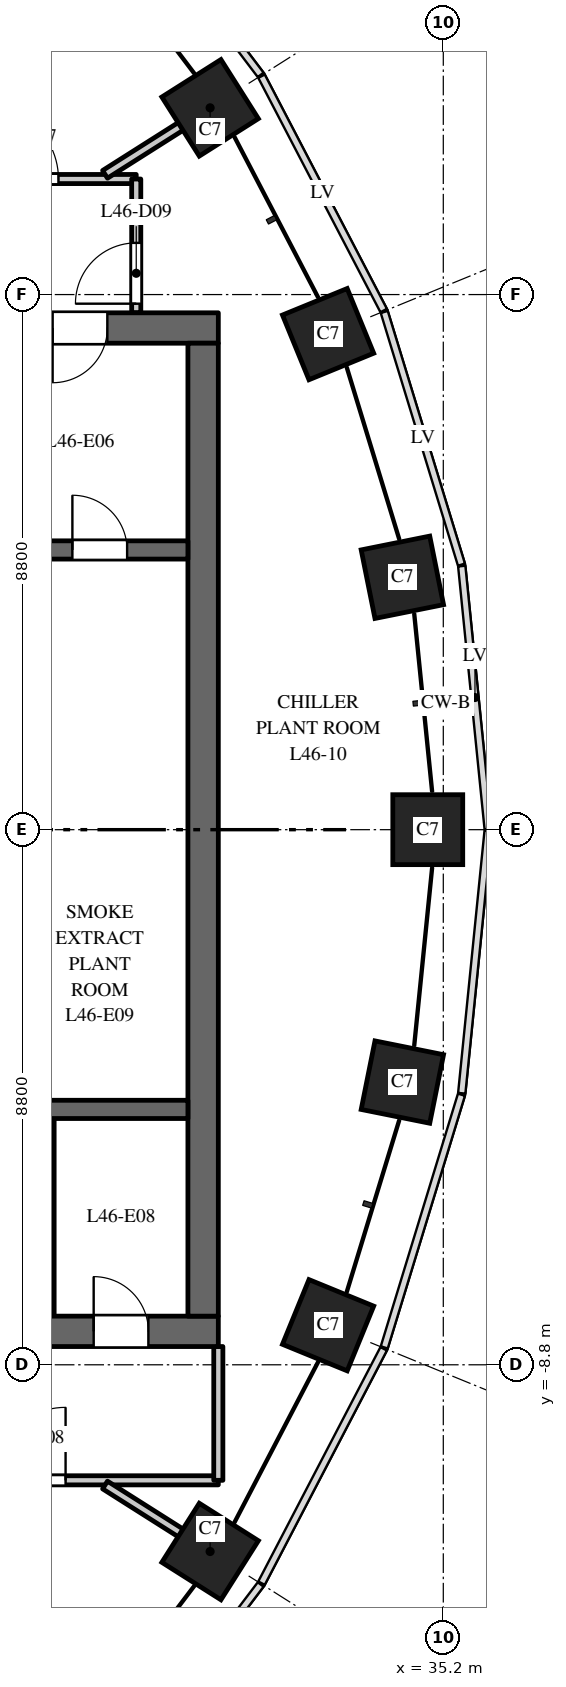
"""IFC4 building model, lengths in metres.
Left out: names, types, materials, properties, quantities, classifications, styles, units other than length and angle.
Written with IfcOpenShell. Run it as: python <this file> out.ifc"""

import sys

from ifc_helpers import new_model, si_unit, direction, frame, frame_2d, origin, origin_2d, place, context, subcontext, project, spatial, rectangle, extrude, element, fill, save


model = new_model("IFC4")
c1 = context("Model", 3, precision=1e-05, world=origin(), true_north=direction((0.0, 1.0)))
c2 = subcontext(c1, "Body", "Model", "MODEL_VIEW")
j1 = project(units=[si_unit("LENGTHUNIT", "METRE"), si_unit("PLANEANGLEUNIT", "RADIAN")], contexts=[c1])
p1 = place(None, origin())
s1 = spatial("IfcSite", under=j1, at=p1, CompositionType="ELEMENT")
p2 = place(p1, origin())
s2 = spatial("IfcBuilding", under=s1, at=p2, CompositionType="ELEMENT")
p3 = place(p2, frame((0.0, 0.0, 198.0)))
s3 = spatial("IfcBuildingStorey", under=s2, at=p3, CompositionType="ELEMENT", Elevation=198.0)
for number, where, z_axis, x_axis in (
    (1, (34.945, 0.0, 0.0), (0.0, 0.0, 1.0), (0.0, 1.0, 0.0)),
    (2, (34.527, 4.151, 0.0), (0.0, 0.0, 1.0), (-0.197, 0.98, 0.0)),
    (3, (33.305, 8.149, 0.0), (0.0, 0.0, 1.0), (-0.379, 0.925, 0.0)),
    (4, (31.365, 11.871, 0.0), (0.0, 0.0, 1.0), (-0.535, 0.845, 0.0)),
    (5, (31.365, -11.871, 0.0), (0.0, 0.0, 1.0), (0.535, 0.845, 0.0)),
    (6, (33.305, -8.149, 0.0), (0.0, 0.0, 1.0), (0.379, 0.925, 0.0)),
    (7, (34.527, -4.151, 0.0), (0.0, 0.0, 1.0), (0.197, 0.98, 0.0)),
):
    element("IfcColumn", number, at=place(p3, frame(where, z_axis=z_axis, x_axis=x_axis)), inside=s3, PredefinedType="COLUMN", context=c2, shape_type="SweptSolid", body=[
        extrude(rectangle(XDim=1.15, YDim=1.15, at=origin_2d()), origin(), (0.0, 0.0, 1.0), 5.5),
    ])
p4 = place(p3, frame((16.5, 8.25, 0.0), z_axis=(0.0, 0.0, 1.0), x_axis=(1.0, 0.0, 0.0)))
e8 = element("IfcWall", 8, at=p4, inside=s3, PredefinedType="SHEAR", context=c2, shape_type="SweptSolid", body=[
    extrude(rectangle(XDim=15.0, YDim=0.5, at=frame_2d((7.5, 0.0))), origin(), (0.0, 0.0, 1.0), 5.15),
])
p5 = place(p4, frame((6.9, 0.0, 0.0)))
e9 = element("IfcOpeningElement", 9, at=p5, cuts=e8, PredefinedType="OPENING", context=c2, shape_type="SweptSolid", body=[
    extrude(rectangle(XDim=1.2, YDim=2.1, at=frame_2d((0.6, 1.05))), frame((0.0, 0.26, 0.0), z_axis=(0.0, -1.0, 0.0), x_axis=(1.0, 0.0, 0.0)), (0.0, 0.0, 1.0), 0.52),
])
p6 = place(p4, frame((12.275, 0.0, 0.0)))
e10 = element("IfcOpeningElement", 10, at=p6, cuts=e8, PredefinedType="OPENING", context=c2, shape_type="SweptSolid", body=[
    extrude(rectangle(XDim=0.9, YDim=2.1, at=frame_2d((0.45, 1.05))), frame((0.0, 0.26, 0.0), z_axis=(0.0, -1.0, 0.0), x_axis=(1.0, 0.0, 0.0)), (0.0, 0.0, 1.0), 0.52),
])
p7 = place(p3, frame((16.5, -8.25, 0.0), z_axis=(0.0, 0.0, 1.0), x_axis=(1.0, 0.0, 0.0)))
e11 = element("IfcWall", 11, at=p7, inside=s3, PredefinedType="SHEAR", context=c2, shape_type="SweptSolid", body=[
    extrude(rectangle(XDim=15.0, YDim=0.5, at=frame_2d((7.5, 0.0))), origin(), (0.0, 0.0, 1.0), 5.15),
])
p8 = place(p7, frame((6.9, 0.0, 0.0)))
e12 = element("IfcOpeningElement", 12, at=p8, cuts=e11, PredefinedType="OPENING", context=c2, shape_type="SweptSolid", body=[
    extrude(rectangle(XDim=1.2, YDim=2.1, at=frame_2d((0.6, 1.05))), frame((0.0, 0.26, 0.0), z_axis=(0.0, -1.0, 0.0), x_axis=(1.0, 0.0, 0.0)), (0.0, 0.0, 1.0), 0.52),
])
p9 = place(p7, frame((12.95, 0.0, 0.0)))
e13 = element("IfcOpeningElement", 13, at=p9, cuts=e11, PredefinedType="OPENING", context=c2, shape_type="SweptSolid", body=[
    extrude(rectangle(XDim=0.9, YDim=2.1, at=frame_2d((0.45, 1.05))), frame((0.0, 0.26, 0.0), z_axis=(0.0, -1.0, 0.0), x_axis=(1.0, 0.0, 0.0)), (0.0, 0.0, 1.0), 0.52),
])
p10 = place(p3, frame((31.25, -8.0, 0.0), z_axis=(0.0, 0.0, 1.0), x_axis=(0.0, 1.0, 0.0)))
e14 = element("IfcWall", 14, at=p10, inside=s3, PredefinedType="SHEAR", context=c2, shape_type="SweptSolid", body=[
    extrude(rectangle(XDim=16.0, YDim=0.5, at=frame_2d((8.0, 0.0))), origin(), (0.0, 0.0, 1.0), 5.15),
])
p11 = place(p3, frame((24.9, 4.6, 0.0), z_axis=(0.0, 0.0, 1.0), x_axis=(1.0, 0.0, 0.0)))
e15 = element("IfcWall", 15, at=p11, inside=s3, PredefinedType="SHEAR", context=c2, shape_type="SweptSolid", body=[
    extrude(rectangle(XDim=6.1, YDim=0.3, at=frame_2d((3.05, 0.0))), origin(), (0.0, 0.0, 1.0), 5.15),
])
p12 = place(p11, frame((4.2, 0.0, 0.0)))
e16 = element("IfcOpeningElement", 16, at=p12, cuts=e15, PredefinedType="OPENING", context=c2, shape_type="SweptSolid", body=[
    extrude(rectangle(XDim=0.9, YDim=2.1, at=frame_2d((0.45, 1.05))), frame((0.0, 0.16, 0.0), z_axis=(0.0, -1.0, 0.0), x_axis=(1.0, 0.0, 0.0)), (0.0, 0.0, 1.0), 0.32),
])
p13 = place(p3, frame((28.7, -8.0, 0.0), z_axis=(0.0, 0.0, 1.0), x_axis=(0.0, 1.0, 0.0)))
e17 = element("IfcWall", 17, at=p13, inside=s3, PredefinedType="PARTITIONING", context=c2, shape_type="SweptSolid", body=[
    extrude(rectangle(XDim=3.25, YDim=0.2, at=frame_2d((1.625, 0.0))), origin(), (0.0, 0.0, 1.0), 5.15),
])
p14 = place(p3, frame((24.9, -4.6, 0.0), z_axis=(0.0, 0.0, 1.0), x_axis=(1.0, 0.0, 0.0)))
e18 = element("IfcWall", 18, at=p14, inside=s3, PredefinedType="SHEAR", context=c2, shape_type="SweptSolid", body=[
    extrude(rectangle(XDim=6.1, YDim=0.3, at=frame_2d((3.05, 0.0))), origin(), (0.0, 0.0, 1.0), 5.15),
])
p15 = place(p3, frame((20.746, -10.7, 0.0), z_axis=(0.0, 0.0, 1.0), x_axis=(1.0, 0.0, 0.0)))
e19 = element("IfcWall", 19, at=p15, inside=s3, PredefinedType="PARTITIONING", context=c2, shape_type="SweptSolid", body=[
    extrude(rectangle(XDim=10.754, YDim=0.15, at=frame_2d((5.377, 0.0))), origin(), (0.0, 0.0, 1.0), 5.15),
])
p16 = place(p15, frame((7.042, 0.0, 0.0)))
e20 = element("IfcOpeningElement", 20, at=p16, cuts=e19, PredefinedType="OPENING", context=c2, shape_type="SweptSolid", body=[
    extrude(rectangle(XDim=1.2, YDim=2.1, at=frame_2d((0.6, 1.05))), frame((0.0, 0.085, 0.0), z_axis=(0.0, -1.0, 0.0), x_axis=(1.0, 0.0, 0.0)), (0.0, 0.0, 1.0), 0.17),
])
p17 = place(p3, frame((20.746, 10.7, 0.0), z_axis=(0.0, 0.0, 1.0), x_axis=(1.0, 0.0, 0.0)))
e21 = element("IfcWall", 21, at=p17, inside=s3, PredefinedType="PARTITIONING", context=c2, shape_type="SweptSolid", body=[
    extrude(rectangle(XDim=9.404, YDim=0.15, at=frame_2d((4.702, 0.0))), origin(), (0.0, 0.0, 1.0), 5.15),
])
p18 = place(p17, frame((6.925, 0.0, 0.0)))
e22 = element("IfcOpeningElement", 22, at=p18, cuts=e21, PredefinedType="OPENING", context=c2, shape_type="SweptSolid", body=[
    extrude(rectangle(XDim=1.2, YDim=2.1, at=frame_2d((0.6, 1.05))), frame((0.0, 0.085, 0.0), z_axis=(0.0, -1.0, 0.0), x_axis=(1.0, 0.0, 0.0)), (0.0, 0.0, 1.0), 0.17),
])
for number, where, z_axis, x_axis in (
    (23, (29.637, -10.777, 0.0), (0.0, 0.0, 1.0), (0.845, -0.535, 0.0)),
    (24, (29.637, 10.777, 0.0), (0.0, 0.0, 1.0), (0.845, 0.535, 0.0)),
):
    element("IfcWall", number, at=place(p3, frame(where, z_axis=z_axis, x_axis=x_axis)), inside=s3, PredefinedType="PARTITIONING", context=c2, shape_type="SweptSolid", body=[
        extrude(rectangle(XDim=2.145, YDim=0.15, at=frame_2d((1.073, 0.0))), origin(), (0.0, 0.0, 1.0), 5.15),
    ])
p19 = place(p3, frame((31.5, -10.7, 0.0), z_axis=(0.0, 0.0, 1.0), x_axis=(0.0, 1.0, 0.0)))
e25 = element("IfcWall", 25, at=p19, inside=s3, PredefinedType="PARTITIONING", context=c2, shape_type="SweptSolid", body=[
    extrude(rectangle(XDim=2.2, YDim=0.15, at=frame_2d((1.1, 0.0))), origin(), (0.0, 0.0, 1.0), 5.15),
])
p20 = place(p3, frame((30.15, 8.5, 0.0), z_axis=(0.0, 0.0, 1.0), x_axis=(0.0, 1.0, 0.0)))
e26 = element("IfcWall", 26, at=p20, inside=s3, PredefinedType="PARTITIONING", context=c2, shape_type="SweptSolid", body=[
    extrude(rectangle(XDim=2.2, YDim=0.15, at=frame_2d((1.1, 0.0))), origin(), (0.0, 0.0, 1.0), 5.15),
])
p21 = place(p20, frame((0.15, 0.0, 0.0)))
e27 = element("IfcOpeningElement", 27, at=p21, cuts=e26, PredefinedType="OPENING", context=c2, shape_type="SweptSolid", body=[
    extrude(rectangle(XDim=1.0, YDim=2.1, at=frame_2d((0.5, 1.05))), frame((0.0, 0.085, 0.0), z_axis=(0.0, -1.0, 0.0), x_axis=(1.0, 0.0, 0.0)), (0.0, 0.0, 1.0), 0.17),
])
p22 = place(p6, origin())
e28 = element("IfcDoor", 28, at=p22, inside=s3, OperationType="SINGLE_SWING_LEFT", PredefinedType="DOOR", context=c2, shape_type="SweptSolid", body=[
    extrude(rectangle(XDim=0.9, YDim=2.1, at=frame_2d((0.45, 1.05))), frame((0.0, 0.025, 0.0), z_axis=(0.0, -1.0, 0.0), x_axis=(1.0, 0.0, 0.0)), (0.0, 0.0, 1.0), 0.05),
])
fill(e10, e28)
p23 = place(p9, origin())
e29 = element("IfcDoor", 29, at=p23, inside=s3, OperationType="SINGLE_SWING_RIGHT", PredefinedType="DOOR", context=c2, shape_type="SweptSolid", body=[
    extrude(rectangle(XDim=0.9, YDim=2.1, at=frame_2d((0.45, 1.05))), frame((0.0, 0.025, 0.0), z_axis=(0.0, -1.0, 0.0), x_axis=(1.0, 0.0, 0.0)), (0.0, 0.0, 1.0), 0.05),
])
fill(e13, e29)
p24 = place(p12, origin())
e30 = element("IfcDoor", 30, at=p24, inside=s3, OperationType="SINGLE_SWING_RIGHT", PredefinedType="DOOR", context=c2, shape_type="SweptSolid", body=[
    extrude(rectangle(XDim=0.9, YDim=2.1, at=frame_2d((0.45, 1.05))), frame((0.0, 0.025, 0.0), z_axis=(0.0, -1.0, 0.0), x_axis=(1.0, 0.0, 0.0)), (0.0, 0.0, 1.0), 0.05),
])
fill(e16, e30)
p25 = place(p18, origin())
e31 = element("IfcDoor", 31, at=p25, inside=s3, OperationType="SINGLE_SWING_LEFT", PredefinedType="DOOR", context=c2, shape_type="SweptSolid", body=[
    extrude(rectangle(XDim=1.2, YDim=2.1, at=frame_2d((0.6, 1.05))), frame((0.0, 0.025, 0.0), z_axis=(0.0, -1.0, 0.0), x_axis=(1.0, 0.0, 0.0)), (0.0, 0.0, 1.0), 0.05),
])
fill(e22, e31)
p26 = place(p16, origin())
e32 = element("IfcDoor", 32, at=p26, inside=s3, OperationType="SINGLE_SWING_RIGHT", PredefinedType="DOOR", context=c2, shape_type="SweptSolid", body=[
    extrude(rectangle(XDim=1.2, YDim=2.1, at=frame_2d((0.6, 1.05))), frame((0.0, 0.025, 0.0), z_axis=(0.0, -1.0, 0.0), x_axis=(1.0, 0.0, 0.0)), (0.0, 0.0, 1.0), 0.05),
])
fill(e20, e32)
p27 = place(p21, origin())
e33 = element("IfcDoor", 33, at=p27, inside=s3, OperationType="SINGLE_SWING_LEFT", PredefinedType="DOOR", context=c2, shape_type="SweptSolid", body=[
    extrude(rectangle(XDim=1.0, YDim=2.1, at=frame_2d((0.5, 1.05))), frame((0.0, 0.025, 0.0), z_axis=(0.0, -1.0, 0.0), x_axis=(1.0, 0.0, 0.0)), (0.0, 0.0, 1.0), 0.05),
])
fill(e27, e33)
save(model, sys.argv[1])
